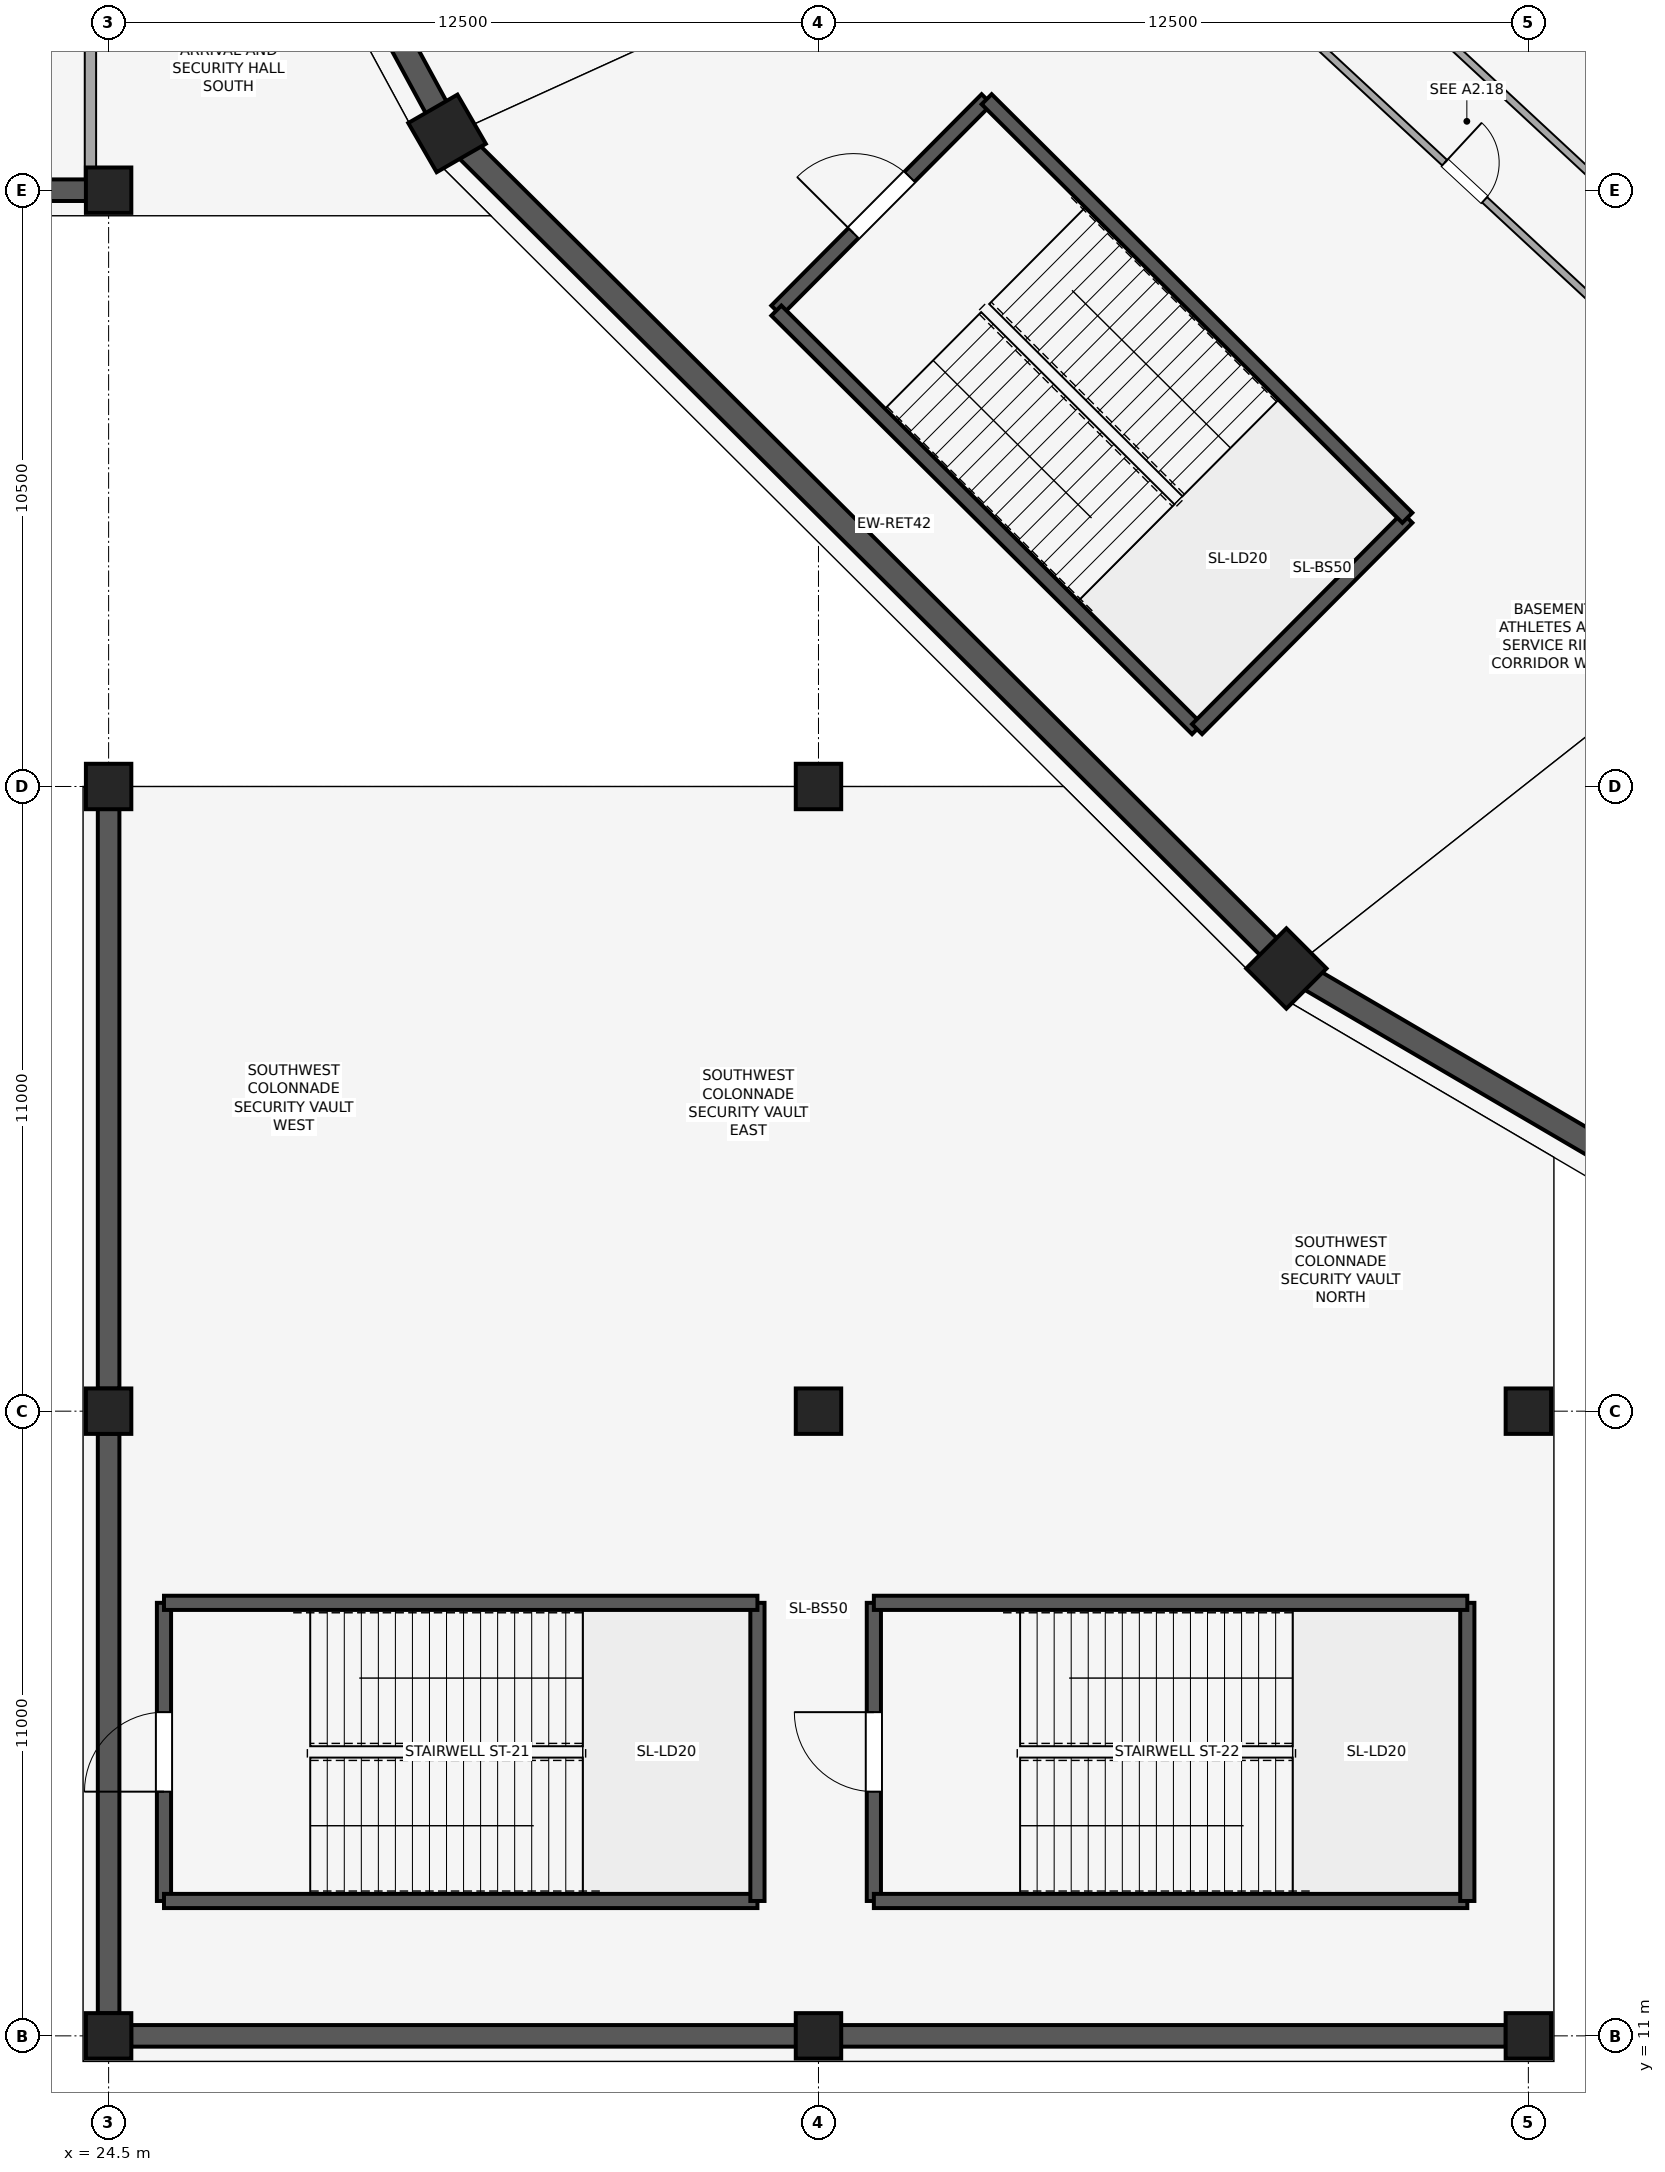
"""IFC4 building model, lengths in metres.
Left out: names, types, materials, properties, quantities, classifications, styles, units other than length and angle.
Written with IfcOpenShell. Run it as: python <this file> out.ifc"""

import sys

from ifc_helpers import new_model, si_unit, direction, frame, frame_2d, origin, origin_2d, place, context, subcontext, project, spatial, rectangle, extrude, element, fill, save


model = new_model("IFC4")
c1 = context("Model", 3, precision=1e-05, world=origin(), true_north=direction((0.0, 1.0)))
c2 = subcontext(c1, "Body", "Model", "MODEL_VIEW")
j1 = project(units=[si_unit("LENGTHUNIT", "METRE"), si_unit("PLANEANGLEUNIT", "RADIAN")], contexts=[c1])
p1 = place(None, origin())
s1 = spatial("IfcSite", under=j1, at=p1, CompositionType="ELEMENT")
p2 = place(p1, origin())
s2 = spatial("IfcBuilding", under=s1, at=p2, CompositionType="ELEMENT")
p3 = place(p2, frame((0.0, 0.0, -5.4)))
s3 = spatial("IfcBuildingStorey", under=s2, at=p3, CompositionType="ELEMENT", Elevation=-5.4)
for number, where, z_axis, x_axis in (
    (1, (30.46, 44.5, 0.0), (0.0, 0.0, 1.0), (-0.866, -0.5, 0.0)),
    (2, (45.239, 29.795, 0.0), (0.0, 0.0, 1.0), (-0.707, -0.707, 0.0)),
):
    element("IfcColumn", number, at=place(p3, frame(where, z_axis=z_axis, x_axis=x_axis)), inside=s3, PredefinedType="COLUMN", context=c2, shape_type="SweptSolid", body=[
        extrude(rectangle(XDim=1.0, YDim=1.0, at=origin_2d()), origin(), (0.0, 0.0, 1.0), 5.4),
    ])
for number, where, z_axis, x_axis in (
    (3, (24.5, 11.0, 0.0), (0.0, 0.0, 1.0), (1.0, 0.0, 0.0)),
    (4, (24.5, 22.0, 0.0), (0.0, 0.0, 1.0), (1.0, 0.0, 0.0)),
    (5, (24.5, 33.0, 0.0), (0.0, 0.0, 1.0), (1.0, 0.0, 0.0)),
    (6, (24.5, 43.5, 0.0), (0.0, 0.0, 1.0), (1.0, 0.0, 0.0)),
    (7, (37.0, 11.0, 0.0), (0.0, 0.0, 1.0), (1.0, 0.0, 0.0)),
    (8, (37.0, 22.0, 0.0), (0.0, 0.0, 1.0), (1.0, 0.0, 0.0)),
    (9, (37.0, 33.0, 0.0), (0.0, 0.0, 1.0), (1.0, 0.0, 0.0)),
    (10, (49.5, 11.0, 0.0), (0.0, 0.0, 1.0), (1.0, 0.0, 0.0)),
    (11, (49.5, 22.0, 0.0), (0.0, 0.0, 1.0), (1.0, 0.0, 0.0)),
):
    element("IfcColumn", number, at=place(p3, frame(where, z_axis=z_axis, x_axis=x_axis)), inside=s3, PredefinedType="COLUMN", context=c2, shape_type="SweptSolid", body=[
        extrude(rectangle(XDim=0.8, YDim=0.8, at=origin_2d()), origin(), (0.0, 0.0, 1.0), 5.4),
    ])
p4 = place(p3, frame((21.217, 61.637, 0.0), z_axis=(0.0, 0.0, 1.0), x_axis=(0.476947954388, -0.878931538178, 0.0)))
e12 = element("IfcWall", 12, at=p4, inside=s3, PredefinedType="SOLIDWALL", context=c2, shape_type="SweptSolid", body=[
    extrude(rectangle(XDim=19.469, YDim=0.42, at=frame_2d((9.734, 0.0))), origin(), (0.0, 0.0, 1.0), 4.45),
])
p5 = place(p3, frame((30.503, 44.525, 0.0), z_axis=(0.0, 0.0, 1.0), x_axis=(0.708961581499, -0.705247102765, 0.0)))
e13 = element("IfcWall", 13, at=p5, inside=s3, PredefinedType="SOLIDWALL", context=c2, shape_type="SweptSolid", body=[
    extrude(rectangle(XDim=20.835, YDim=0.42, at=frame_2d((10.418, 0.0))), origin(), (0.0, 0.0, 1.0), 4.45),
])
p6 = place(p3, frame((45.274, 29.831, 0.0), z_axis=(0.0, 0.0, 1.0), x_axis=(0.862881315776, -0.505406603523, 0.0)))
e14 = element("IfcWall", 14, at=p6, inside=s3, PredefinedType="SOLIDWALL", context=c2, shape_type="SweptSolid", body=[
    extrude(rectangle(XDim=22.31, YDim=0.42, at=frame_2d((11.155, 0.0))), origin(), (0.0, 0.0, 1.0), 4.45),
])
for number, where, z_axis, x_axis in (
    (15, (12.397, 43.5, 0.0), (0.0, 0.0, 1.0), (1.0, 0.0, 0.0)),
    (16, (24.897, 11.0, 0.0), (0.0, 0.0, 1.0), (1.0, 0.0, 0.0)),
    (17, (37.397, 11.0, 0.0), (0.0, 0.0, 1.0), (1.0, 0.0, 0.0)),
):
    element("IfcWall", number, at=place(p3, frame(where, z_axis=z_axis, x_axis=x_axis)), inside=s3, PredefinedType="SOLIDWALL", context=c2, shape_type="SweptSolid", body=[
        extrude(rectangle(XDim=11.706, YDim=0.38, at=frame_2d((5.853, 0.0))), origin(), (0.0, 0.0, 1.0), 4.43),
    ])
for number, where, z_axis, x_axis in (
    (18, (24.5, 11.397, 0.0), (0.0, 0.0, 1.0), (0.0, 1.0, 0.0)),
    (19, (24.5, 22.397, 0.0), (0.0, 0.0, 1.0), (0.0, 1.0, 0.0)),
):
    element("IfcWall", number, at=place(p3, frame(where, z_axis=z_axis, x_axis=x_axis)), inside=s3, PredefinedType="SOLIDWALL", context=c2, shape_type="SweptSolid", body=[
        extrude(rectangle(XDim=10.206, YDim=0.38, at=frame_2d((5.103, 0.0))), origin(), (0.0, 0.0, 1.0), 4.43),
    ])
p7 = place(p3, frame((39.961, 45.102, 0.0), z_axis=(0.0, 0.0, 1.0), x_axis=(-0.705314141126, -0.708894888067, 0.0)))
e20 = element("IfcWall", 20, at=p7, inside=s3, PredefinedType="SHEAR", context=c2, shape_type="SweptSolid", body=[
    extrude(rectangle(XDim=5.25, YDim=0.25, at=frame_2d((2.625, 0.0))), origin(), (0.0, 0.0, 1.0), 5.05),
])
p8 = place(p7, frame((1.925, 0.0, 0.0)))
e21 = element("IfcOpeningElement", 21, at=p8, cuts=e20, PredefinedType="OPENING", context=c2, shape_type="SweptSolid", body=[
    extrude(rectangle(XDim=1.4, YDim=2.2, at=frame_2d((0.7, 1.1))), frame((0.0, 0.135, 0.0), z_axis=(0.0, -1.0, 0.0), x_axis=(1.0, 0.0, 0.0)), (0.0, 0.0, 1.0), 0.27),
])
p9 = place(p3, frame((36.258, 41.38, 0.0), z_axis=(0.0, 0.0, 1.0), x_axis=(0.708891762409, -0.705317282639, 0.0)))
e22 = element("IfcWall", 22, at=p9, inside=s3, PredefinedType="SHEAR", context=c2, shape_type="SweptSolid", body=[
    extrude(rectangle(XDim=10.45, YDim=0.25, at=frame_2d((5.225, 0.0))), origin(), (0.0, 0.0, 1.0), 5.05),
])
p10 = place(p3, frame((43.666, 34.01, 0.0), z_axis=(0.0, 0.0, 1.0), x_axis=(0.705314141126, 0.708894888067, 0.0)))
e23 = element("IfcWall", 23, at=p10, inside=s3, PredefinedType="SHEAR", context=c2, shape_type="SweptSolid", body=[
    extrude(rectangle(XDim=5.25, YDim=0.25, at=frame_2d((2.625, 0.0))), origin(), (0.0, 0.0, 1.0), 5.05),
])
p11 = place(p3, frame((47.369, 37.731, 0.0), z_axis=(0.0, 0.0, 1.0), x_axis=(-0.708891762409, 0.705317282639, 0.0)))
e24 = element("IfcWall", 24, at=p11, inside=s3, PredefinedType="SHEAR", context=c2, shape_type="SweptSolid", body=[
    extrude(rectangle(XDim=10.45, YDim=0.25, at=frame_2d((5.225, 0.0))), origin(), (0.0, 0.0, 1.0), 5.05),
])
p12 = place(p3, frame((25.475, 18.625, 0.0), z_axis=(0.0, 0.0, 1.0), x_axis=(0.0, -1.0, 0.0)))
e25 = element("IfcWall", 25, at=p12, inside=s3, PredefinedType="SHEAR", context=c2, shape_type="SweptSolid", body=[
    extrude(rectangle(XDim=5.25, YDim=0.25, at=frame_2d((2.625, 0.0))), origin(), (0.0, 0.0, 1.0), 5.05),
])
p13 = place(p12, frame((1.925, 0.0, 0.0)))
e26 = element("IfcOpeningElement", 26, at=p13, cuts=e25, PredefinedType="OPENING", context=c2, shape_type="SweptSolid", body=[
    extrude(rectangle(XDim=1.4, YDim=2.2, at=frame_2d((0.7, 1.1))), frame((0.0, 0.135, 0.0), z_axis=(0.0, -1.0, 0.0), x_axis=(1.0, 0.0, 0.0)), (0.0, 0.0, 1.0), 0.27),
])
p14 = place(p3, frame((25.475, 13.375, 0.0), z_axis=(0.0, 0.0, 1.0), x_axis=(1.0, 0.0, 0.0)))
e27 = element("IfcWall", 27, at=p14, inside=s3, PredefinedType="SHEAR", context=c2, shape_type="SweptSolid", body=[
    extrude(rectangle(XDim=10.45, YDim=0.25, at=frame_2d((5.225, 0.0))), origin(), (0.0, 0.0, 1.0), 5.05),
])
p15 = place(p3, frame((35.925, 13.375, 0.0), z_axis=(0.0, 0.0, 1.0), x_axis=(0.0, 1.0, 0.0)))
e28 = element("IfcWall", 28, at=p15, inside=s3, PredefinedType="SHEAR", context=c2, shape_type="SweptSolid", body=[
    extrude(rectangle(XDim=5.25, YDim=0.25, at=frame_2d((2.625, 0.0))), origin(), (0.0, 0.0, 1.0), 5.05),
])
p16 = place(p3, frame((35.925, 18.625, 0.0), z_axis=(0.0, 0.0, 1.0), x_axis=(-1.0, 0.0, 0.0)))
e29 = element("IfcWall", 29, at=p16, inside=s3, PredefinedType="SHEAR", context=c2, shape_type="SweptSolid", body=[
    extrude(rectangle(XDim=10.45, YDim=0.25, at=frame_2d((5.225, 0.0))), origin(), (0.0, 0.0, 1.0), 5.05),
])
p17 = place(p3, frame((37.975, 18.625, 0.0), z_axis=(0.0, 0.0, 1.0), x_axis=(0.0, -1.0, 0.0)))
e30 = element("IfcWall", 30, at=p17, inside=s3, PredefinedType="SHEAR", context=c2, shape_type="SweptSolid", body=[
    extrude(rectangle(XDim=5.25, YDim=0.25, at=frame_2d((2.625, 0.0))), origin(), (0.0, 0.0, 1.0), 5.05),
])
p18 = place(p17, frame((1.925, 0.0, 0.0)))
e31 = element("IfcOpeningElement", 31, at=p18, cuts=e30, PredefinedType="OPENING", context=c2, shape_type="SweptSolid", body=[
    extrude(rectangle(XDim=1.4, YDim=2.2, at=frame_2d((0.7, 1.1))), frame((0.0, 0.135, 0.0), z_axis=(0.0, -1.0, 0.0), x_axis=(1.0, 0.0, 0.0)), (0.0, 0.0, 1.0), 0.27),
])
p19 = place(p3, frame((37.975, 13.375, 0.0), z_axis=(0.0, 0.0, 1.0), x_axis=(1.0, 0.0, 0.0)))
e32 = element("IfcWall", 32, at=p19, inside=s3, PredefinedType="SHEAR", context=c2, shape_type="SweptSolid", body=[
    extrude(rectangle(XDim=10.45, YDim=0.25, at=frame_2d((5.225, 0.0))), origin(), (0.0, 0.0, 1.0), 5.05),
])
p20 = place(p3, frame((48.425, 13.375, 0.0), z_axis=(0.0, 0.0, 1.0), x_axis=(0.0, 1.0, 0.0)))
e33 = element("IfcWall", 33, at=p20, inside=s3, PredefinedType="SHEAR", context=c2, shape_type="SweptSolid", body=[
    extrude(rectangle(XDim=5.25, YDim=0.25, at=frame_2d((2.625, 0.0))), origin(), (0.0, 0.0, 1.0), 5.05),
])
p21 = place(p3, frame((48.425, 18.625, 0.0), z_axis=(0.0, 0.0, 1.0), x_axis=(-1.0, 0.0, 0.0)))
e34 = element("IfcWall", 34, at=p21, inside=s3, PredefinedType="SHEAR", context=c2, shape_type="SweptSolid", body=[
    extrude(rectangle(XDim=10.45, YDim=0.25, at=frame_2d((5.225, 0.0))), origin(), (0.0, 0.0, 1.0), 5.05),
])
p22 = place(p3, frame((45.215, 46.593, 0.0), z_axis=(0.0, 0.0, 1.0), x_axis=(0.73300806751, -0.680219944551, 0.0)))
e35 = element("IfcWall", 35, at=p22, inside=s3, PredefinedType="PARTITIONING", context=c2, shape_type="SweptSolid", body=[
    extrude(rectangle(XDim=8.63, YDim=0.13, at=frame_2d((4.315, 0.0))), origin(), (0.0, 0.0, 1.0), 3.8),
])
p23 = place(p22, frame((3.835, 0.0, 0.0)))
e36 = element("IfcOpeningElement", 36, at=p23, cuts=e35, PredefinedType="OPENING", context=c2, shape_type="SweptSolid", body=[
    extrude(rectangle(XDim=0.96, YDim=2.24, at=frame_2d((0.48, 1.12))), frame((0.0, 0.075, 0.0), z_axis=(0.0, -1.0, 0.0), x_axis=(1.0, 0.0, 0.0)), (0.0, 0.0, 1.0), 0.15),
])
p24 = place(p3, frame((46.304, 47.765, 0.0), z_axis=(0.0, 0.0, 1.0), x_axis=(0.732994977595, -0.68023405003, 0.0)))
e37 = element("IfcWall", 37, at=p24, inside=s3, PredefinedType="PARTITIONING", context=c2, shape_type="SweptSolid", body=[
    extrude(rectangle(XDim=8.63, YDim=0.13, at=frame_2d((4.315, 0.0))), origin(), (0.0, 0.0, 1.0), 3.8),
])
p25 = place(p3, frame((24.18, 43.685, 0.0), z_axis=(0.0, 0.0, 1.0), x_axis=(0.0, 1.0, 0.0)))
e38 = element("IfcWall", 38, at=p25, inside=s3, PredefinedType="PARTITIONING", context=c2, shape_type="SweptSolid", body=[
    extrude(rectangle(XDim=10.18, YDim=0.2, at=frame_2d((5.09, 0.0))), origin(), (0.0, 0.0, 1.0), 3.8),
])
p26 = place(p25, frame((4.37, 0.0, 0.0)))
e39 = element("IfcOpeningElement", 39, at=p26, cuts=e38, PredefinedType="OPENING", context=c2, shape_type="SweptSolid", body=[
    extrude(rectangle(XDim=1.44, YDim=2.1, at=frame_2d((0.72, 1.05))), frame((0.0, 0.11, 0.0), z_axis=(0.0, -1.0, 0.0), x_axis=(1.0, 0.0, 0.0)), (0.0, 0.0, 1.0), 0.22),
])
p27 = place(p8, frame((1.4, 0.0, 0.0), z_axis=(0.0, 0.0, 1.0), x_axis=(-1.0, 0.0, 0.0)))
e40 = element("IfcDoor", 40, at=p27, inside=s3, OperationType="SINGLE_SWING_LEFT", PredefinedType="DOOR", context=c2, shape_type="SweptSolid", body=[
    extrude(rectangle(XDim=1.4, YDim=2.2, at=frame_2d((0.7, 1.1))), frame((0.0, 0.025, 0.0), z_axis=(0.0, -1.0, 0.0), x_axis=(1.0, 0.0, 0.0)), (0.0, 0.0, 1.0), 0.05),
])
fill(e21, e40)
p28 = place(p13, frame((1.4, 0.0, 0.0), z_axis=(0.0, 0.0, 1.0), x_axis=(-1.0, 0.0, 0.0)))
e41 = element("IfcDoor", 41, at=p28, inside=s3, OperationType="SINGLE_SWING_LEFT", PredefinedType="DOOR", context=c2, shape_type="SweptSolid", body=[
    extrude(rectangle(XDim=1.4, YDim=2.2, at=frame_2d((0.7, 1.1))), frame((0.0, 0.025, 0.0), z_axis=(0.0, -1.0, 0.0), x_axis=(1.0, 0.0, 0.0)), (0.0, 0.0, 1.0), 0.05),
])
fill(e26, e41)
p29 = place(p18, frame((1.4, 0.0, 0.0), z_axis=(0.0, 0.0, 1.0), x_axis=(-1.0, 0.0, 0.0)))
e42 = element("IfcDoor", 42, at=p29, inside=s3, OperationType="SINGLE_SWING_RIGHT", PredefinedType="DOOR", context=c2, shape_type="SweptSolid", body=[
    extrude(rectangle(XDim=1.4, YDim=2.2, at=frame_2d((0.7, 1.1))), frame((0.0, 0.025, 0.0), z_axis=(0.0, -1.0, 0.0), x_axis=(1.0, 0.0, 0.0)), (0.0, 0.0, 1.0), 0.05),
])
fill(e31, e42)
p30 = place(p23, origin())
e43 = element("IfcDoor", 43, at=p30, inside=s3, OperationType="SINGLE_SWING_LEFT", PredefinedType="DOOR", context=c2, shape_type="SweptSolid", body=[
    extrude(rectangle(XDim=0.96, YDim=2.24, at=frame_2d((0.48, 1.12))), frame((0.0, 0.025, 0.0), z_axis=(0.0, -1.0, 0.0), x_axis=(1.0, 0.0, 0.0)), (0.0, 0.0, 1.0), 0.05),
])
fill(e36, e43)
save(model, sys.argv[1])
